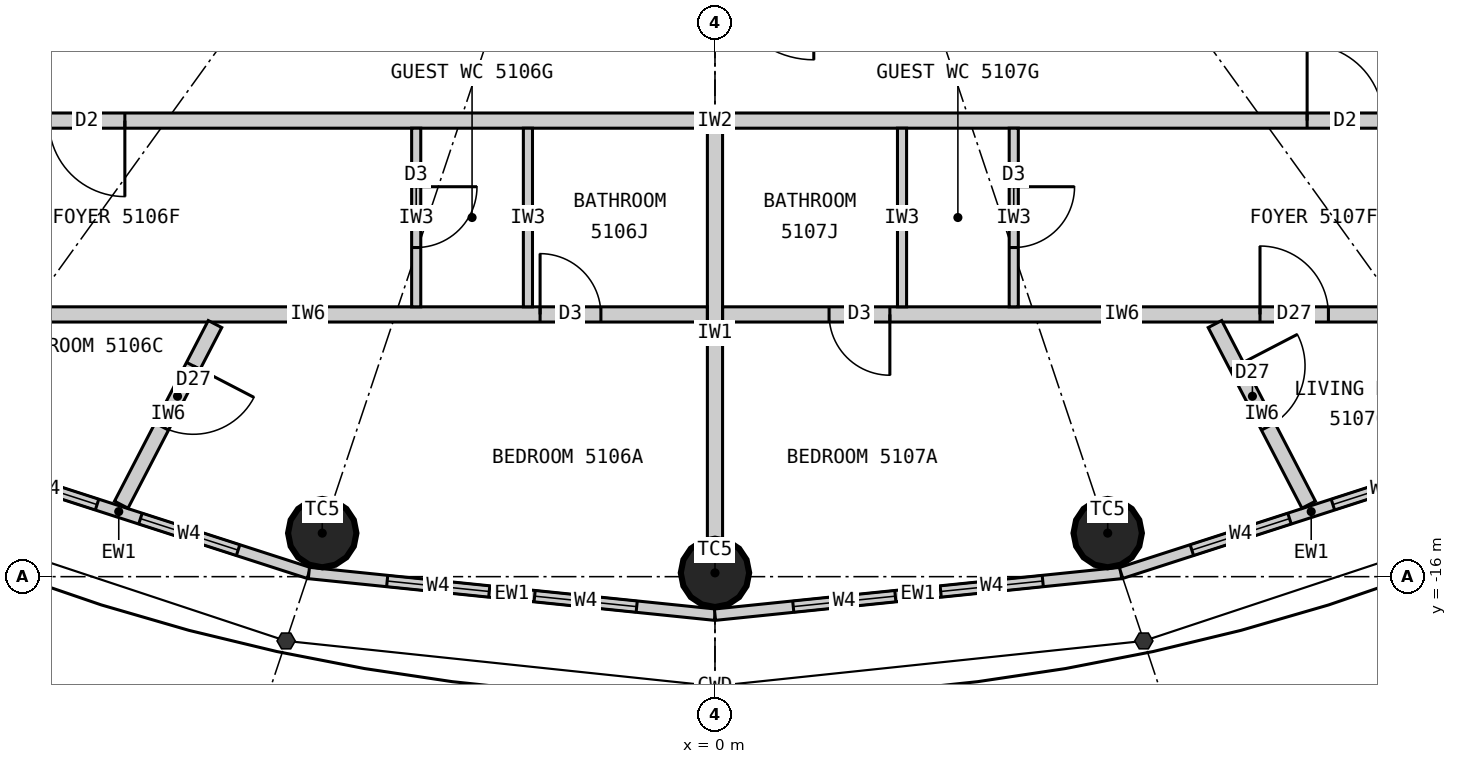
"""IFC4 building model, lengths in metres.
Left out: names, types, materials, properties, quantities, classifications, styles, units other than length and angle.
Written with IfcOpenShell. Run it as: python <this file> out.ifc"""

import sys

from ifc_helpers import new_model, si_unit, direction, frame, frame_2d, origin, origin_2d, place, context, subcontext, project, spatial, rectangle, circle, extrude, element, fill, save


model = new_model("IFC4")
c1 = context("Model", 3, precision=1e-05, world=origin(), true_north=direction((0.0, 1.0)))
c2 = subcontext(c1, "Body", "Model", "MODEL_VIEW")
j1 = project(units=[si_unit("LENGTHUNIT", "METRE"), si_unit("PLANEANGLEUNIT", "RADIAN")], contexts=[c1])
p1 = place(None, origin())
s1 = spatial("IfcSite", under=j1, at=p1, CompositionType="ELEMENT")
p2 = place(p1, origin())
s2 = spatial("IfcBuilding", under=s1, at=p2, CompositionType="ELEMENT")
p3 = place(p2, frame((0.0, 0.0, 192.9)))
s3 = spatial("IfcBuildingStorey", under=s2, at=p3, CompositionType="ELEMENT", Elevation=192.9)
for number, where, z_axis, x_axis in (
    (1, (-5.167, -15.427, 0.0), (0.0, 0.0, 1.0), (1.0, 0.0, 0.0)),
    (2, (0.0, -15.95, 0.0), (0.0, 0.0, 1.0), (1.0, 0.0, 0.0)),
    (3, (5.167, -15.427, 0.0), (0.0, 0.0, 1.0), (1.0, 0.0, 0.0)),
):
    element("IfcColumn", number, at=place(p3, frame(where, z_axis=z_axis, x_axis=x_axis)), inside=s3, PredefinedType="COLUMN", context=c2, shape_type="SweptSolid", body=[
        extrude(circle(Radius=0.45, at=origin_2d()), origin(), (0.0, 0.0, 1.0), 3.3),
    ])
p4 = place(p3, frame((-10.346, -14.336, 0.0), z_axis=(0.0, 0.0, 1.0), x_axis=(0.951644702515, -0.307200846638, 0.0)))
e4 = element("IfcWall", 4, at=p4, inside=s3, PredefinedType="ELEMENTEDWALL", context=c2, shape_type="SweptSolid", body=[
    extrude(rectangle(XDim=5.258, YDim=0.15, at=frame_2d((2.629, 0.0))), origin(), (0.0, 0.0, 1.0), 3.12),
])
p5 = place(p4, frame((0.979, 0.0, 0.9)))
e5 = element("IfcOpeningElement", 5, at=p5, cuts=e4, PredefinedType="OPENING", context=c2, shape_type="SweptSolid", body=[
    extrude(rectangle(XDim=1.35, YDim=1.9, at=frame_2d((0.675, 0.95))), frame((0.0, 0.085, 0.0), z_axis=(0.0, -1.0, 0.0), x_axis=(1.0, 0.0, 0.0)), (0.0, 0.0, 1.0), 0.17),
])
p6 = place(p4, frame((2.929, 0.0, 0.9)))
e6 = element("IfcOpeningElement", 6, at=p6, cuts=e4, PredefinedType="OPENING", context=c2, shape_type="SweptSolid", body=[
    extrude(rectangle(XDim=1.35, YDim=1.9, at=frame_2d((0.675, 0.95))), frame((0.0, 0.085, 0.0), z_axis=(0.0, -1.0, 0.0), x_axis=(1.0, 0.0, 0.0)), (0.0, 0.0, 1.0), 0.17),
])
p7 = place(p3, frame((-5.343, -15.952, 0.0), z_axis=(0.0, 0.0, 1.0), x_axis=(0.994774574972, -0.102095763818, 0.0)))
e7 = element("IfcWall", 7, at=p7, inside=s3, PredefinedType="ELEMENTEDWALL", context=c2, shape_type="SweptSolid", body=[
    extrude(rectangle(XDim=5.371, YDim=0.15, at=frame_2d((2.686, 0.0))), origin(), (0.0, 0.0, 1.0), 3.12),
])
p8 = place(p7, frame((1.035, 0.0, 0.9)))
e8 = element("IfcOpeningElement", 8, at=p8, cuts=e7, PredefinedType="OPENING", context=c2, shape_type="SweptSolid", body=[
    extrude(rectangle(XDim=1.35, YDim=1.9, at=frame_2d((0.675, 0.95))), frame((0.0, 0.085, 0.0), z_axis=(0.0, -1.0, 0.0), x_axis=(1.0, 0.0, 0.0)), (0.0, 0.0, 1.0), 0.17),
])
p9 = place(p7, frame((2.985, 0.0, 0.9)))
e9 = element("IfcOpeningElement", 9, at=p9, cuts=e7, PredefinedType="OPENING", context=c2, shape_type="SweptSolid", body=[
    extrude(rectangle(XDim=1.35, YDim=1.9, at=frame_2d((0.675, 0.95))), frame((0.0, 0.085, 0.0), z_axis=(0.0, -1.0, 0.0), x_axis=(1.0, 0.0, 0.0)), (0.0, 0.0, 1.0), 0.17),
])
p10 = place(p3, frame((0.0, -16.5, 0.0), z_axis=(0.0, 0.0, 1.0), x_axis=(0.994774574972, 0.102095763818, 0.0)))
e10 = element("IfcWall", 10, at=p10, inside=s3, PredefinedType="ELEMENTEDWALL", context=c2, shape_type="SweptSolid", body=[
    extrude(rectangle(XDim=5.371, YDim=0.15, at=frame_2d((2.686, 0.0))), origin(), (0.0, 0.0, 1.0), 3.12),
])
p11 = place(p10, frame((1.035, 0.0, 0.9)))
e11 = element("IfcOpeningElement", 11, at=p11, cuts=e10, PredefinedType="OPENING", context=c2, shape_type="SweptSolid", body=[
    extrude(rectangle(XDim=1.35, YDim=1.9, at=frame_2d((0.675, 0.95))), frame((0.0, 0.085, 0.0), z_axis=(0.0, -1.0, 0.0), x_axis=(1.0, 0.0, 0.0)), (0.0, 0.0, 1.0), 0.17),
])
p12 = place(p10, frame((2.985, 0.0, 0.9)))
e12 = element("IfcOpeningElement", 12, at=p12, cuts=e10, PredefinedType="OPENING", context=c2, shape_type="SweptSolid", body=[
    extrude(rectangle(XDim=1.35, YDim=1.9, at=frame_2d((0.675, 0.95))), frame((0.0, 0.085, 0.0), z_axis=(0.0, -1.0, 0.0), x_axis=(1.0, 0.0, 0.0)), (0.0, 0.0, 1.0), 0.17),
])
p13 = place(p3, frame((5.343, -15.952, 0.0), z_axis=(0.0, 0.0, 1.0), x_axis=(0.951644702515, 0.307200846638, 0.0)))
e13 = element("IfcWall", 13, at=p13, inside=s3, PredefinedType="ELEMENTEDWALL", context=c2, shape_type="SweptSolid", body=[
    extrude(rectangle(XDim=5.258, YDim=0.15, at=frame_2d((2.629, 0.0))), origin(), (0.0, 0.0, 1.0), 3.12),
])
p14 = place(p13, frame((0.979, 0.0, 0.9)))
e14 = element("IfcOpeningElement", 14, at=p14, cuts=e13, PredefinedType="OPENING", context=c2, shape_type="SweptSolid", body=[
    extrude(rectangle(XDim=1.35, YDim=1.9, at=frame_2d((0.675, 0.95))), frame((0.0, 0.085, 0.0), z_axis=(0.0, -1.0, 0.0), x_axis=(1.0, 0.0, 0.0)), (0.0, 0.0, 1.0), 0.17),
])
p15 = place(p13, frame((2.929, 0.0, 0.9)))
e15 = element("IfcOpeningElement", 15, at=p15, cuts=e13, PredefinedType="OPENING", context=c2, shape_type="SweptSolid", body=[
    extrude(rectangle(XDim=1.35, YDim=1.9, at=frame_2d((0.675, 0.95))), frame((0.0, 0.085, 0.0), z_axis=(0.0, -1.0, 0.0), x_axis=(1.0, 0.0, 0.0)), (0.0, 0.0, 1.0), 0.17),
])
p16 = place(p3, frame((11.1, -10.0, 0.0), z_axis=(0.0, 0.0, 1.0), x_axis=(-1.0, 0.0, 0.0)))
e16 = element("IfcWall", 16, at=p16, inside=s3, PredefinedType="PARTITIONING", context=c2, shape_type="SweptSolid", body=[
    extrude(rectangle(XDim=22.2, YDim=0.2, at=frame_2d((11.1, 0.0))), origin(), (0.0, 0.0, 1.0), 3.12),
])
p17 = place(p16, frame((18.864, 0.0, 0.0)))
e17 = element("IfcOpeningElement", 17, at=p17, cuts=e16, PredefinedType="OPENING", context=c2, shape_type="SweptSolid", body=[
    extrude(rectangle(XDim=1.0, YDim=2.2, at=frame_2d((0.5, 1.1))), frame((0.0, 0.11, 0.0), z_axis=(0.0, -1.0, 0.0), x_axis=(1.0, 0.0, 0.0)), (0.0, 0.0, 1.0), 0.22),
])
p18 = place(p16, frame((2.309, 0.0, 0.0)))
e18 = element("IfcOpeningElement", 18, at=p18, cuts=e16, PredefinedType="OPENING", context=c2, shape_type="SweptSolid", body=[
    extrude(rectangle(XDim=1.0, YDim=2.2, at=frame_2d((0.5, 1.1))), frame((0.0, 0.11, 0.0), z_axis=(0.0, -1.0, 0.0), x_axis=(1.0, 0.0, 0.0)), (0.0, 0.0, 1.0), 0.22),
])
p19 = place(p3, frame((0.0, -10.1, 0.0), z_axis=(0.0, 0.0, 1.0), x_axis=(0.0, -1.0, 0.0)))
e19 = element("IfcWall", 19, at=p19, inside=s3, PredefinedType="PARTITIONING", context=c2, shape_type="SweptSolid", body=[
    extrude(rectangle(XDim=5.4, YDim=0.2, at=frame_2d((2.7, 0.0))), origin(), (0.0, 0.0, 1.0), 2.27),
])
p20 = place(p3, frame((-10.609, -12.55, 0.0), z_axis=(0.0, 0.0, 1.0), x_axis=(1.0, 0.0, 0.0)))
e20 = element("IfcWall", 20, at=p20, inside=s3, PredefinedType="PARTITIONING", context=c2, shape_type="SweptSolid", body=[
    extrude(rectangle(XDim=10.508, YDim=0.2, at=frame_2d((5.254, 0.0))), origin(), (0.0, 0.0, 1.0), 3.12),
])
p21 = place(p20, frame((8.308, 0.0, 0.0)))
e21 = element("IfcOpeningElement", 21, at=p21, cuts=e20, PredefinedType="OPENING", context=c2, shape_type="SweptSolid", body=[
    extrude(rectangle(XDim=0.8, YDim=2.1, at=frame_2d((0.4, 1.05))), frame((0.0, 0.11, 0.0), z_axis=(0.0, -1.0, 0.0), x_axis=(1.0, 0.0, 0.0)), (0.0, 0.0, 1.0), 0.22),
])
p22 = place(p3, frame((-6.578, -12.677, 0.0), z_axis=(0.0, 0.0, 1.0), x_axis=(-0.460620531465, -0.887597164255, 0.0)))
e22 = element("IfcWall", 22, at=p22, inside=s3, PredefinedType="PARTITIONING", context=c2, shape_type="SweptSolid", body=[
    extrude(rectangle(XDim=2.678, YDim=0.2, at=frame_2d((1.339, 0.0))), origin(), (0.0, 0.0, 1.0), 3.12),
])
p23 = place(p22, frame((0.62, 0.0, 0.0)))
e23 = element("IfcOpeningElement", 23, at=p23, cuts=e22, PredefinedType="OPENING", context=c2, shape_type="SweptSolid", body=[
    extrude(rectangle(XDim=0.9, YDim=2.1, at=frame_2d((0.45, 1.05))), frame((0.0, 0.11, 0.0), z_axis=(0.0, -1.0, 0.0), x_axis=(1.0, 0.0, 0.0)), (0.0, 0.0, 1.0), 0.22),
])
p24 = place(p3, frame((-3.931, -10.1, 0.0), z_axis=(0.0, 0.0, 1.0), x_axis=(0.0, -1.0, 0.0)))
e24 = element("IfcWall", 24, at=p24, inside=s3, PredefinedType="PARTITIONING", context=c2, shape_type="SweptSolid", body=[
    extrude(rectangle(XDim=2.35, YDim=0.12, at=frame_2d((1.175, 0.0))), origin(), (0.0, 0.0, 1.0), 3.12),
])
p25 = place(p24, frame((0.77, 0.0, 0.0)))
e25 = element("IfcOpeningElement", 25, at=p25, cuts=e24, PredefinedType="OPENING", context=c2, shape_type="SweptSolid", body=[
    extrude(rectangle(XDim=0.8, YDim=2.1, at=frame_2d((0.4, 1.05))), frame((0.0, 0.07, 0.0), z_axis=(0.0, -1.0, 0.0), x_axis=(1.0, 0.0, 0.0)), (0.0, 0.0, 1.0), 0.14),
])
p26 = place(p3, frame((-2.461, -10.1, 0.0), z_axis=(0.0, 0.0, 1.0), x_axis=(0.0, -1.0, 0.0)))
e26 = element("IfcWall", 26, at=p26, inside=s3, PredefinedType="PARTITIONING", context=c2, shape_type="SweptSolid", body=[
    extrude(rectangle(XDim=2.35, YDim=0.12, at=frame_2d((1.175, 0.0))), origin(), (0.0, 0.0, 1.0), 3.12),
])
p27 = place(p3, frame((0.101, -12.55, 0.0), z_axis=(0.0, 0.0, 1.0), x_axis=(1.0, 0.0, 0.0)))
e27 = element("IfcWall", 27, at=p27, inside=s3, PredefinedType="PARTITIONING", context=c2, shape_type="SweptSolid", body=[
    extrude(rectangle(XDim=10.508, YDim=0.2, at=frame_2d((5.254, 0.0))), origin(), (0.0, 0.0, 1.0), 3.12),
])
p28 = place(p27, frame((1.4, 0.0, 0.0)))
e28 = element("IfcOpeningElement", 28, at=p28, cuts=e27, PredefinedType="OPENING", context=c2, shape_type="SweptSolid", body=[
    extrude(rectangle(XDim=0.8, YDim=2.1, at=frame_2d((0.4, 1.05))), frame((0.0, 0.11, 0.0), z_axis=(0.0, -1.0, 0.0), x_axis=(1.0, 0.0, 0.0)), (0.0, 0.0, 1.0), 0.22),
])
p29 = place(p27, frame((7.07, 0.0, 0.0)))
e29 = element("IfcOpeningElement", 29, at=p29, cuts=e27, PredefinedType="OPENING", context=c2, shape_type="SweptSolid", body=[
    extrude(rectangle(XDim=0.9, YDim=2.1, at=frame_2d((0.45, 1.05))), frame((0.0, 0.11, 0.0), z_axis=(0.0, -1.0, 0.0), x_axis=(1.0, 0.0, 0.0)), (0.0, 0.0, 1.0), 0.22),
])
p30 = place(p3, frame((6.578, -12.677, 0.0), z_axis=(0.0, 0.0, 1.0), x_axis=(0.460620531465, -0.887597164255, 0.0)))
e30 = element("IfcWall", 30, at=p30, inside=s3, PredefinedType="PARTITIONING", context=c2, shape_type="SweptSolid", body=[
    extrude(rectangle(XDim=2.678, YDim=0.2, at=frame_2d((1.339, 0.0))), origin(), (0.0, 0.0, 1.0), 3.12),
])
p31 = place(p30, frame((0.62, 0.0, 0.0)))
e31 = element("IfcOpeningElement", 31, at=p31, cuts=e30, PredefinedType="OPENING", context=c2, shape_type="SweptSolid", body=[
    extrude(rectangle(XDim=0.9, YDim=2.1, at=frame_2d((0.45, 1.05))), frame((0.0, 0.11, 0.0), z_axis=(0.0, -1.0, 0.0), x_axis=(1.0, 0.0, 0.0)), (0.0, 0.0, 1.0), 0.22),
])
p32 = place(p3, frame((2.461, -10.1, 0.0), z_axis=(0.0, 0.0, 1.0), x_axis=(0.0, -1.0, 0.0)))
e32 = element("IfcWall", 32, at=p32, inside=s3, PredefinedType="PARTITIONING", context=c2, shape_type="SweptSolid", body=[
    extrude(rectangle(XDim=2.35, YDim=0.12, at=frame_2d((1.175, 0.0))), origin(), (0.0, 0.0, 1.0), 3.12),
])
p33 = place(p3, frame((3.931, -10.1, 0.0), z_axis=(0.0, 0.0, 1.0), x_axis=(0.0, -1.0, 0.0)))
e33 = element("IfcWall", 33, at=p33, inside=s3, PredefinedType="PARTITIONING", context=c2, shape_type="SweptSolid", body=[
    extrude(rectangle(XDim=2.35, YDim=0.12, at=frame_2d((1.175, 0.0))), origin(), (0.0, 0.0, 1.0), 3.12),
])
p34 = place(p33, frame((0.77, 0.0, 0.0)))
e34 = element("IfcOpeningElement", 34, at=p34, cuts=e33, PredefinedType="OPENING", context=c2, shape_type="SweptSolid", body=[
    extrude(rectangle(XDim=0.8, YDim=2.1, at=frame_2d((0.4, 1.05))), frame((0.0, 0.07, 0.0), z_axis=(0.0, -1.0, 0.0), x_axis=(1.0, 0.0, 0.0)), (0.0, 0.0, 1.0), 0.14),
])
p35 = place(p5, origin())
e35 = element("IfcWindow", 35, at=p35, inside=s3, PartitioningType="SINGLE_PANEL", PredefinedType="WINDOW", context=c2, shape_type="SweptSolid", body=[
    extrude(rectangle(XDim=1.35, YDim=1.9, at=frame_2d((0.675, 0.95))), frame((0.0, 0.03, 0.0), z_axis=(0.0, -1.0, 0.0), x_axis=(1.0, 0.0, 0.0)), (0.0, 0.0, 1.0), 0.06),
])
fill(e5, e35)
p36 = place(p6, origin())
e36 = element("IfcWindow", 36, at=p36, inside=s3, PartitioningType="SINGLE_PANEL", PredefinedType="WINDOW", context=c2, shape_type="SweptSolid", body=[
    extrude(rectangle(XDim=1.35, YDim=1.9, at=frame_2d((0.675, 0.95))), frame((0.0, 0.03, 0.0), z_axis=(0.0, -1.0, 0.0), x_axis=(1.0, 0.0, 0.0)), (0.0, 0.0, 1.0), 0.06),
])
fill(e6, e36)
p37 = place(p8, origin())
e37 = element("IfcWindow", 37, at=p37, inside=s3, PartitioningType="SINGLE_PANEL", PredefinedType="WINDOW", context=c2, shape_type="SweptSolid", body=[
    extrude(rectangle(XDim=1.35, YDim=1.9, at=frame_2d((0.675, 0.95))), frame((0.0, 0.03, 0.0), z_axis=(0.0, -1.0, 0.0), x_axis=(1.0, 0.0, 0.0)), (0.0, 0.0, 1.0), 0.06),
])
fill(e8, e37)
p38 = place(p9, origin())
e38 = element("IfcWindow", 38, at=p38, inside=s3, PartitioningType="SINGLE_PANEL", PredefinedType="WINDOW", context=c2, shape_type="SweptSolid", body=[
    extrude(rectangle(XDim=1.35, YDim=1.9, at=frame_2d((0.675, 0.95))), frame((0.0, 0.03, 0.0), z_axis=(0.0, -1.0, 0.0), x_axis=(1.0, 0.0, 0.0)), (0.0, 0.0, 1.0), 0.06),
])
fill(e9, e38)
p39 = place(p11, origin())
e39 = element("IfcWindow", 39, at=p39, inside=s3, PartitioningType="SINGLE_PANEL", PredefinedType="WINDOW", context=c2, shape_type="SweptSolid", body=[
    extrude(rectangle(XDim=1.35, YDim=1.9, at=frame_2d((0.675, 0.95))), frame((0.0, 0.03, 0.0), z_axis=(0.0, -1.0, 0.0), x_axis=(1.0, 0.0, 0.0)), (0.0, 0.0, 1.0), 0.06),
])
fill(e11, e39)
p40 = place(p12, origin())
e40 = element("IfcWindow", 40, at=p40, inside=s3, PartitioningType="SINGLE_PANEL", PredefinedType="WINDOW", context=c2, shape_type="SweptSolid", body=[
    extrude(rectangle(XDim=1.35, YDim=1.9, at=frame_2d((0.675, 0.95))), frame((0.0, 0.03, 0.0), z_axis=(0.0, -1.0, 0.0), x_axis=(1.0, 0.0, 0.0)), (0.0, 0.0, 1.0), 0.06),
])
fill(e12, e40)
p41 = place(p14, origin())
e41 = element("IfcWindow", 41, at=p41, inside=s3, PartitioningType="SINGLE_PANEL", PredefinedType="WINDOW", context=c2, shape_type="SweptSolid", body=[
    extrude(rectangle(XDim=1.35, YDim=1.9, at=frame_2d((0.675, 0.95))), frame((0.0, 0.03, 0.0), z_axis=(0.0, -1.0, 0.0), x_axis=(1.0, 0.0, 0.0)), (0.0, 0.0, 1.0), 0.06),
])
fill(e14, e41)
p42 = place(p15, origin())
e42 = element("IfcWindow", 42, at=p42, inside=s3, PartitioningType="SINGLE_PANEL", PredefinedType="WINDOW", context=c2, shape_type="SweptSolid", body=[
    extrude(rectangle(XDim=1.35, YDim=1.9, at=frame_2d((0.675, 0.95))), frame((0.0, 0.03, 0.0), z_axis=(0.0, -1.0, 0.0), x_axis=(1.0, 0.0, 0.0)), (0.0, 0.0, 1.0), 0.06),
])
fill(e15, e42)
p43 = place(p17, origin())
e43 = element("IfcDoor", 43, at=p43, inside=s3, OperationType="SINGLE_SWING_LEFT", PredefinedType="DOOR", context=c2, shape_type="SweptSolid", body=[
    extrude(rectangle(XDim=1.0, YDim=2.2, at=frame_2d((0.5, 1.1))), frame((0.0, 0.025, 0.0), z_axis=(0.0, -1.0, 0.0), x_axis=(1.0, 0.0, 0.0)), (0.0, 0.0, 1.0), 0.05),
])
fill(e17, e43)
p44 = place(p25, origin())
e44 = element("IfcDoor", 44, at=p44, inside=s3, OperationType="SINGLE_SWING_LEFT", PredefinedType="DOOR", context=c2, shape_type="SweptSolid", body=[
    extrude(rectangle(XDim=0.8, YDim=2.1, at=frame_2d((0.4, 1.05))), frame((0.0, 0.025, 0.0), z_axis=(0.0, -1.0, 0.0), x_axis=(1.0, 0.0, 0.0)), (0.0, 0.0, 1.0), 0.05),
])
fill(e25, e44)
p45 = place(p21, origin())
e45 = element("IfcDoor", 45, at=p45, inside=s3, OperationType="SINGLE_SWING_LEFT", PredefinedType="DOOR", context=c2, shape_type="SweptSolid", body=[
    extrude(rectangle(XDim=0.8, YDim=2.1, at=frame_2d((0.4, 1.05))), frame((0.0, 0.025, 0.0), z_axis=(0.0, -1.0, 0.0), x_axis=(1.0, 0.0, 0.0)), (0.0, 0.0, 1.0), 0.05),
])
fill(e21, e45)
p46 = place(p23, origin())
e46 = element("IfcDoor", 46, at=p46, inside=s3, OperationType="SINGLE_SWING_LEFT", PredefinedType="DOOR", context=c2, shape_type="SweptSolid", body=[
    extrude(rectangle(XDim=0.9, YDim=2.1, at=frame_2d((0.45, 1.05))), frame((0.0, 0.025, 0.0), z_axis=(0.0, -1.0, 0.0), x_axis=(1.0, 0.0, 0.0)), (0.0, 0.0, 1.0), 0.05),
])
fill(e23, e46)
p47 = place(p18, origin())
e47 = element("IfcDoor", 47, at=p47, inside=s3, OperationType="SINGLE_SWING_RIGHT", PredefinedType="DOOR", context=c2, shape_type="SweptSolid", body=[
    extrude(rectangle(XDim=1.0, YDim=2.2, at=frame_2d((0.5, 1.1))), frame((0.0, 0.025, 0.0), z_axis=(0.0, -1.0, 0.0), x_axis=(1.0, 0.0, 0.0)), (0.0, 0.0, 1.0), 0.05),
])
fill(e18, e47)
p48 = place(p28, origin())
e48 = element("IfcDoor", 48, at=p48, inside=s3, OperationType="SINGLE_SWING_RIGHT", PredefinedType="DOOR", context=c2, shape_type="SweptSolid", body=[
    extrude(rectangle(XDim=0.8, YDim=2.1, at=frame_2d((0.4, 1.05))), frame((0.0, 0.025, 0.0), z_axis=(0.0, -1.0, 0.0), x_axis=(1.0, 0.0, 0.0)), (0.0, 0.0, 1.0), 0.05),
])
fill(e28, e48)
p49 = place(p34, origin())
e49 = element("IfcDoor", 49, at=p49, inside=s3, OperationType="SINGLE_SWING_LEFT", PredefinedType="DOOR", context=c2, shape_type="SweptSolid", body=[
    extrude(rectangle(XDim=0.8, YDim=2.1, at=frame_2d((0.4, 1.05))), frame((0.0, 0.025, 0.0), z_axis=(0.0, -1.0, 0.0), x_axis=(1.0, 0.0, 0.0)), (0.0, 0.0, 1.0), 0.05),
])
fill(e34, e49)
p50 = place(p29, origin())
e50 = element("IfcDoor", 50, at=p50, inside=s3, OperationType="SINGLE_SWING_LEFT", PredefinedType="DOOR", context=c2, shape_type="SweptSolid", body=[
    extrude(rectangle(XDim=0.9, YDim=2.1, at=frame_2d((0.45, 1.05))), frame((0.0, 0.025, 0.0), z_axis=(0.0, -1.0, 0.0), x_axis=(1.0, 0.0, 0.0)), (0.0, 0.0, 1.0), 0.05),
])
fill(e29, e50)
p51 = place(p31, origin())
e51 = element("IfcDoor", 51, at=p51, inside=s3, OperationType="SINGLE_SWING_LEFT", PredefinedType="DOOR", context=c2, shape_type="SweptSolid", body=[
    extrude(rectangle(XDim=0.9, YDim=2.1, at=frame_2d((0.45, 1.05))), frame((0.0, 0.025, 0.0), z_axis=(0.0, -1.0, 0.0), x_axis=(1.0, 0.0, 0.0)), (0.0, 0.0, 1.0), 0.05),
])
fill(e31, e51)
save(model, sys.argv[1])
